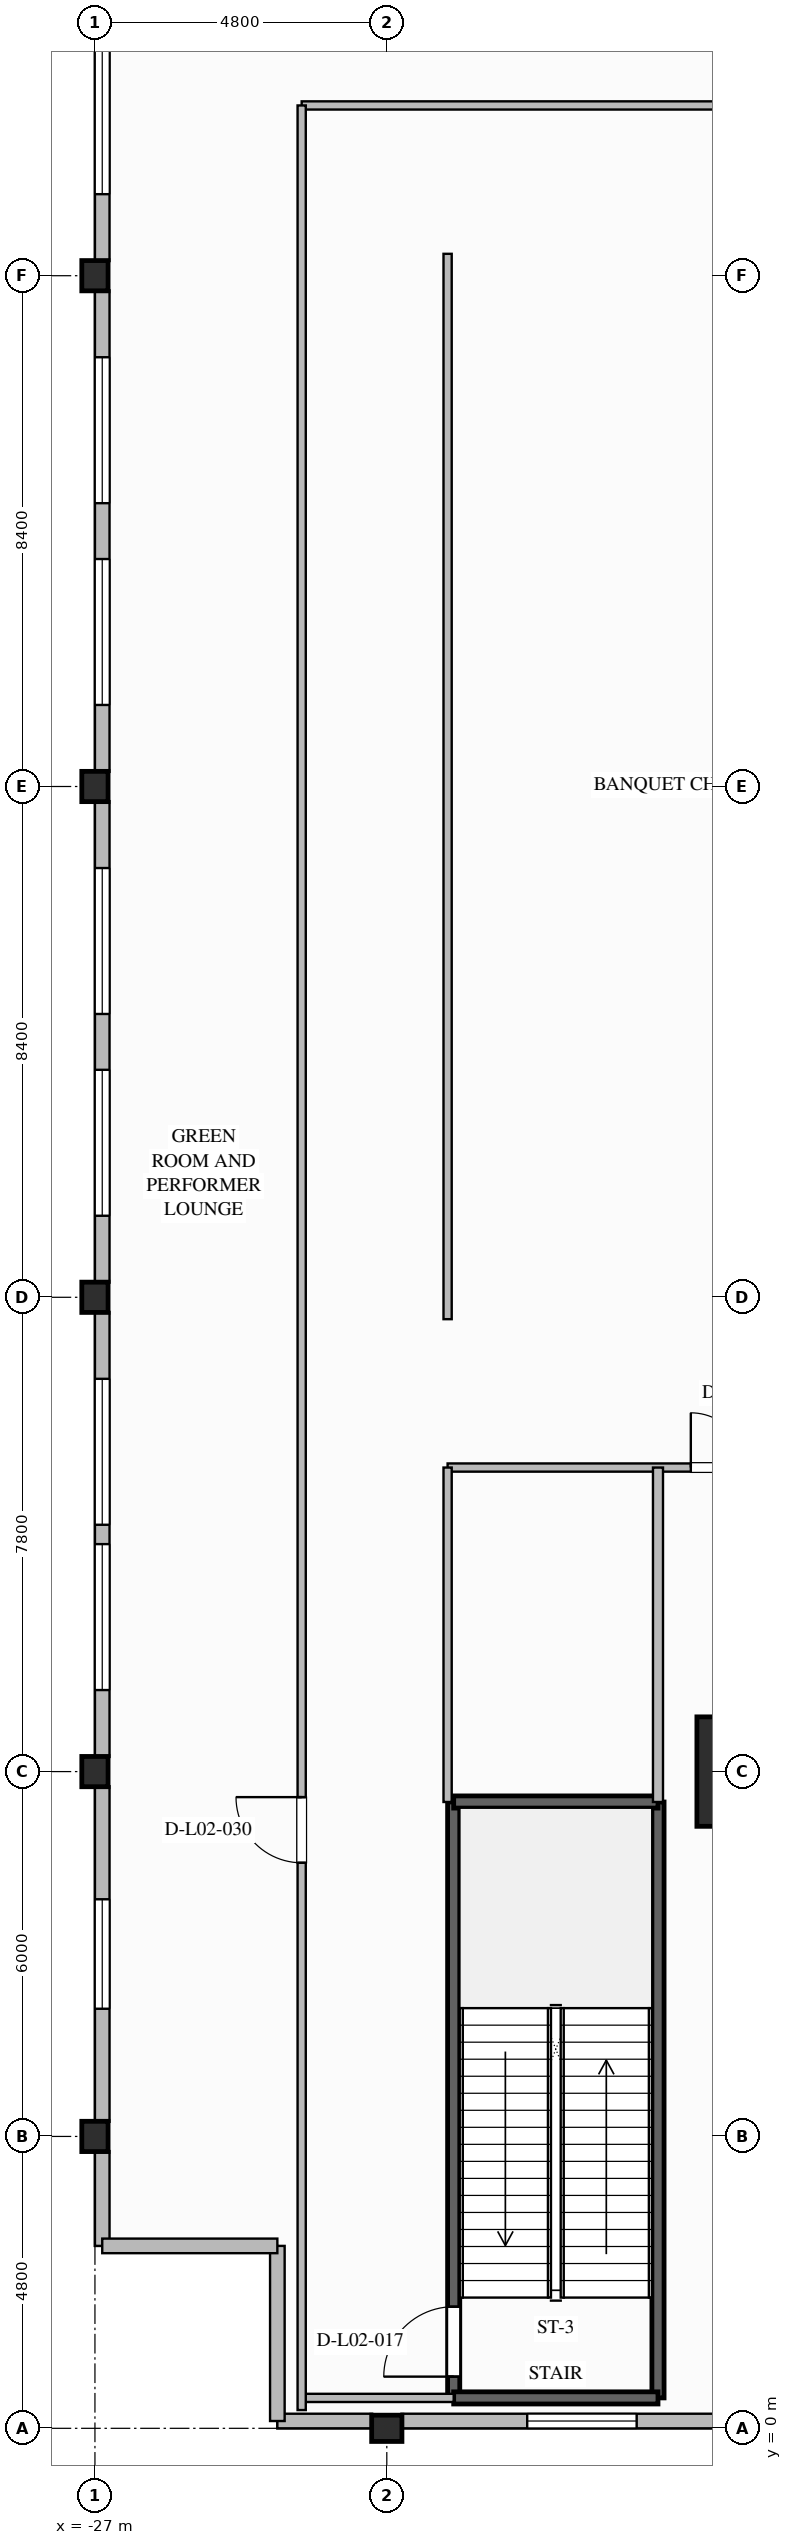
"""IFC4 building model, lengths in metres.
Left out: names, types, materials, properties, quantities, classifications, styles, units other than length and angle.
Written with IfcOpenShell. Run it as: python <this file> out.ifc"""

import sys

from ifc_helpers import new_model, si_unit, direction, frame, frame_2d, origin, origin_2d, place, context, subcontext, project, spatial, rectangle, i_section, extrude, element, fill, save


model = new_model("IFC4")
c1 = context("Model", 3, precision=1e-05, world=origin(), true_north=direction((0.0, 1.0)))
c2 = subcontext(c1, "Body", "Model", "MODEL_VIEW")
j1 = project(units=[si_unit("LENGTHUNIT", "METRE"), si_unit("PLANEANGLEUNIT", "RADIAN")], contexts=[c1])
p1 = place(None, origin())
s1 = spatial("IfcSite", under=j1, at=p1, CompositionType="ELEMENT")
p2 = place(p1, origin())
s2 = spatial("IfcBuilding", under=s1, at=p2, CompositionType="ELEMENT")
p3 = place(p2, frame((0.0, 0.0, 10.8)))
s3 = spatial("IfcBuildingStorey", under=s2, at=p3, CompositionType="ELEMENT", Elevation=10.8)
p4 = place(p3, frame((-16.2, 10.8, 0.0), z_axis=(0.0, 0.0, 1.0), x_axis=(1.0, 0.0, 0.0)))
e1 = element("IfcColumn", 1, at=p4, inside=s3, PredefinedType="COLUMN", context=c2, shape_type="SweptSolid", body=[
    extrude(rectangle(XDim=1.8, YDim=1.8, at=origin_2d()), origin(), (0.0, 0.0, 1.0), 6.4),
])
for number, where, z_axis, x_axis in (
    (2, (-27.0, 4.8, 0.0), (0.0, 0.0, 1.0), (1.0, 0.0, 0.0)),
    (3, (-27.0, 10.8, 0.0), (0.0, 0.0, 1.0), (1.0, 0.0, 0.0)),
    (4, (-27.0, 18.6, 0.0), (0.0, 0.0, 1.0), (1.0, 0.0, 0.0)),
    (5, (-27.0, 27.0, 0.0), (0.0, 0.0, 1.0), (1.0, 0.0, 0.0)),
    (6, (-27.0, 35.4, 0.0), (0.0, 0.0, 1.0), (1.0, 0.0, 0.0)),
    (7, (-22.2, 0.0, 0.0), (0.0, 0.0, 1.0), (0.0, 1.0, 0.0)),
):
    element("IfcColumn", number, at=place(p3, frame(where, z_axis=z_axis, x_axis=x_axis)), inside=s3, PredefinedType="COLUMN", context=c2, shape_type="SweptSolid", body=[
        extrude(i_section(OverallWidth=0.432, OverallDepth=0.498, WebThickness=0.056, FlangeThickness=0.089, FilletRadius=0.03, at=origin_2d()), origin(), (0.0, 0.0, 1.0), 6.4),
    ])
p5 = place(p3, frame((-26.88, 3.0, 0.0), z_axis=(0.0, 0.0, 1.0), x_axis=(0.0, 1.0, 0.0)))
e8 = element("IfcWall", 8, at=p5, inside=s3, PredefinedType="STANDARD", context=c2, shape_type="SweptSolid", body=[
    extrude(rectangle(XDim=1.559, YDim=0.24, at=frame_2d((0.78, 0.0))), origin(), (0.0, 0.0, 1.0), 6.1),
])
p6 = place(p3, frame((-26.88, 5.041, 0.0), z_axis=(0.0, 0.0, 1.0), x_axis=(0.0, 1.0, 0.0)))
e9 = element("IfcWall", 9, at=p6, inside=s3, PredefinedType="STANDARD", context=c2, shape_type="SweptSolid", body=[
    extrude(rectangle(XDim=5.518, YDim=0.24, at=frame_2d((2.759, 0.0))), origin(), (0.0, 0.0, 1.0), 5.404),
])
p7 = place(p6, frame((1.859, 0.0, 0.7)))
e10 = element("IfcOpeningElement", 10, at=p7, cuts=e9, PredefinedType="OPENING", context=c2, shape_type="SweptSolid", body=[
    extrude(rectangle(XDim=1.8, YDim=2.2, at=frame_2d((0.9, 1.1))), frame((0.0, 0.13, 0.0), z_axis=(0.0, -1.0, 0.0), x_axis=(1.0, 0.0, 0.0)), (0.0, 0.0, 1.0), 0.26),
])
p8 = place(p3, frame((-26.88, 11.041, 0.0), z_axis=(0.0, 0.0, 1.0), x_axis=(0.0, 1.0, 0.0)))
e11 = element("IfcWall", 11, at=p8, inside=s3, PredefinedType="STANDARD", context=c2, shape_type="SweptSolid", body=[
    extrude(rectangle(XDim=7.318, YDim=0.24, at=frame_2d((3.659, 0.0))), origin(), (0.0, 0.0, 1.0), 5.404),
])
p9 = place(p8, frame((1.1, 0.0, 0.7)))
e12 = element("IfcOpeningElement", 12, at=p9, cuts=e11, PredefinedType="OPENING", context=c2, shape_type="SweptSolid", body=[
    extrude(rectangle(XDim=2.4, YDim=2.4, at=frame_2d((1.2, 1.2))), frame((0.0, 0.13, 0.0), z_axis=(0.0, -1.0, 0.0), x_axis=(1.0, 0.0, 0.0)), (0.0, 0.0, 1.0), 0.26),
])
p10 = place(p8, frame((3.818, 0.0, 0.7)))
e13 = element("IfcOpeningElement", 13, at=p10, cuts=e11, PredefinedType="OPENING", context=c2, shape_type="SweptSolid", body=[
    extrude(rectangle(XDim=2.4, YDim=2.4, at=frame_2d((1.2, 1.2))), frame((0.0, 0.13, 0.0), z_axis=(0.0, -1.0, 0.0), x_axis=(1.0, 0.0, 0.0)), (0.0, 0.0, 1.0), 0.26),
])
p11 = place(p3, frame((-26.88, 18.841, 0.0), z_axis=(0.0, 0.0, 1.0), x_axis=(0.0, 1.0, 0.0)))
e14 = element("IfcWall", 14, at=p11, inside=s3, PredefinedType="STANDARD", context=c2, shape_type="SweptSolid", body=[
    extrude(rectangle(XDim=7.918, YDim=0.24, at=frame_2d((3.959, 0.0))), origin(), (0.0, 0.0, 1.0), 5.404),
])
p12 = place(p11, frame((1.1, 0.0, 0.7)))
e15 = element("IfcOpeningElement", 15, at=p12, cuts=e14, PredefinedType="OPENING", context=c2, shape_type="SweptSolid", body=[
    extrude(rectangle(XDim=2.4, YDim=2.4, at=frame_2d((1.2, 1.2))), frame((0.0, 0.13, 0.0), z_axis=(0.0, -1.0, 0.0), x_axis=(1.0, 0.0, 0.0)), (0.0, 0.0, 1.0), 0.26),
])
p13 = place(p11, frame((4.418, 0.0, 0.7)))
e16 = element("IfcOpeningElement", 16, at=p13, cuts=e14, PredefinedType="OPENING", context=c2, shape_type="SweptSolid", body=[
    extrude(rectangle(XDim=2.4, YDim=2.4, at=frame_2d((1.2, 1.2))), frame((0.0, 0.13, 0.0), z_axis=(0.0, -1.0, 0.0), x_axis=(1.0, 0.0, 0.0)), (0.0, 0.0, 1.0), 0.26),
])
p14 = place(p3, frame((-26.88, 27.241, 0.0), z_axis=(0.0, 0.0, 1.0), x_axis=(0.0, 1.0, 0.0)))
e17 = element("IfcWall", 17, at=p14, inside=s3, PredefinedType="STANDARD", context=c2, shape_type="SweptSolid", body=[
    extrude(rectangle(XDim=7.918, YDim=0.24, at=frame_2d((3.959, 0.0))), origin(), (0.0, 0.0, 1.0), 5.404),
])
p15 = place(p14, frame((1.1, 0.0, 0.7)))
e18 = element("IfcOpeningElement", 18, at=p15, cuts=e17, PredefinedType="OPENING", context=c2, shape_type="SweptSolid", body=[
    extrude(rectangle(XDim=2.4, YDim=2.4, at=frame_2d((1.2, 1.2))), frame((0.0, 0.13, 0.0), z_axis=(0.0, -1.0, 0.0), x_axis=(1.0, 0.0, 0.0)), (0.0, 0.0, 1.0), 0.26),
])
p16 = place(p14, frame((4.418, 0.0, 0.7)))
e19 = element("IfcOpeningElement", 19, at=p16, cuts=e17, PredefinedType="OPENING", context=c2, shape_type="SweptSolid", body=[
    extrude(rectangle(XDim=2.4, YDim=2.4, at=frame_2d((1.2, 1.2))), frame((0.0, 0.13, 0.0), z_axis=(0.0, -1.0, 0.0), x_axis=(1.0, 0.0, 0.0)), (0.0, 0.0, 1.0), 0.26),
])
p17 = place(p3, frame((-26.88, 35.641, 0.0), z_axis=(0.0, 0.0, 1.0), x_axis=(0.0, 1.0, 0.0)))
e20 = element("IfcWall", 20, at=p17, inside=s3, PredefinedType="STANDARD", context=c2, shape_type="SweptSolid", body=[
    extrude(rectangle(XDim=7.318, YDim=0.24, at=frame_2d((3.659, 0.0))), origin(), (0.0, 0.0, 1.0), 5.404),
])
p18 = place(p17, frame((1.1, 0.0, 0.7)))
e21 = element("IfcOpeningElement", 21, at=p18, cuts=e20, PredefinedType="OPENING", context=c2, shape_type="SweptSolid", body=[
    extrude(rectangle(XDim=2.4, YDim=2.4, at=frame_2d((1.2, 1.2))), frame((0.0, 0.13, 0.0), z_axis=(0.0, -1.0, 0.0), x_axis=(1.0, 0.0, 0.0)), (0.0, 0.0, 1.0), 0.26),
])
p19 = place(p17, frame((3.818, 0.0, 0.7)))
e22 = element("IfcOpeningElement", 22, at=p19, cuts=e20, PredefinedType="OPENING", context=c2, shape_type="SweptSolid", body=[
    extrude(rectangle(XDim=2.4, YDim=2.4, at=frame_2d((1.2, 1.2))), frame((0.0, 0.13, 0.0), z_axis=(0.0, -1.0, 0.0), x_axis=(1.0, 0.0, 0.0)), (0.0, 0.0, 1.0), 0.26),
])
p20 = place(p3, frame((-22.441, 0.12, 0.0), z_axis=(0.0, 0.0, 1.0), x_axis=(-1.0, 0.0, 0.0)))
e23 = element("IfcWall", 23, at=p20, inside=s3, PredefinedType="STANDARD", context=c2, shape_type="SweptSolid", body=[
    extrude(rectangle(XDim=1.559, YDim=0.24, at=frame_2d((0.78, 0.0))), origin(), (0.0, 0.0, 1.0), 6.1),
])
p21 = place(p3, frame((-16.441, 0.12, 0.0), z_axis=(0.0, 0.0, 1.0), x_axis=(-1.0, 0.0, 0.0)))
e24 = element("IfcWall", 24, at=p21, inside=s3, PredefinedType="STANDARD", context=c2, shape_type="SweptSolid", body=[
    extrude(rectangle(XDim=5.518, YDim=0.24, at=frame_2d((2.759, 0.0))), origin(), (0.0, 0.0, 1.0), 5.404),
])
p22 = place(p21, frame((1.65, 0.0, 0.65)))
e25 = element("IfcOpeningElement", 25, at=p22, cuts=e24, PredefinedType="OPENING", context=c2, shape_type="SweptSolid", body=[
    extrude(rectangle(XDim=1.8, YDim=2.2, at=frame_2d((0.9, 1.1))), frame((0.0, 0.13, 0.0), z_axis=(0.0, -1.0, 0.0), x_axis=(1.0, 0.0, 0.0)), (0.0, 0.0, 1.0), 0.26),
])
for number, where, z_axis, x_axis in (
    (26, (-24.0, 0.12, 0.0), (0.0, 0.0, 1.0), (0.0, 1.0, 0.0)),
    (27, (-24.0, 3.0, 0.0), (0.0, 0.0, 1.0), (-1.0, 0.0, 0.0)),
):
    element("IfcWall", number, at=place(p3, frame(where, z_axis=z_axis, x_axis=x_axis)), inside=s3, PredefinedType="STANDARD", context=c2, shape_type="SweptSolid", body=[
        extrude(rectangle(XDim=2.88, YDim=0.24, at=frame_2d((1.44, 0.0))), origin(), (0.0, 0.0, 1.0), 6.1),
    ])
p23 = place(p3, frame((-21.1, 0.5, 0.0), z_axis=(0.0, 0.0, 1.0), x_axis=(0.0, 1.0, 0.0)))
e28 = element("IfcWall", 28, at=p23, inside=s3, PredefinedType="SOLIDWALL", context=c2, shape_type="SweptSolid", body=[
    extrude(rectangle(XDim=9.8, YDim=0.2, at=frame_2d((4.9, 0.0))), origin(), (0.0, 0.0, 1.0), 6.1),
])
p24 = place(p23, frame((0.35, 0.0, 0.0)))
e29 = element("IfcOpeningElement", 29, at=p24, cuts=e28, PredefinedType="OPENING", context=c2, shape_type="SweptSolid", body=[
    extrude(rectangle(XDim=1.15, YDim=2.15, at=frame_2d((0.575, 1.075))), frame((0.0, 0.11, 0.0), z_axis=(0.0, -1.0, 0.0), x_axis=(1.0, 0.0, 0.0)), (0.0, 0.0, 1.0), 0.22),
])
p25 = place(p3, frame((-17.74, 10.3, 0.0), z_axis=(0.0, 0.0, 1.0), x_axis=(0.0, -1.0, 0.0)))
e30 = element("IfcWall", 30, at=p25, inside=s3, PredefinedType="SOLIDWALL", context=c2, shape_type="SweptSolid", body=[
    extrude(rectangle(XDim=9.8, YDim=0.2, at=frame_2d((4.9, 0.0))), origin(), (0.0, 0.0, 1.0), 6.1),
])
for number, where, z_axis, x_axis in (
    (31, (-21.1, 0.5, 0.0), (0.0, 0.0, 1.0), (1.0, 0.0, 0.0)),
    (32, (-17.74, 10.3, 0.0), (0.0, 0.0, 1.0), (-1.0, 0.0, 0.0)),
):
    element("IfcWall", number, at=place(p3, frame(where, z_axis=z_axis, x_axis=x_axis)), inside=s3, PredefinedType="SOLIDWALL", context=c2, shape_type="SweptSolid", body=[
        extrude(rectangle(XDim=3.36, YDim=0.2, at=frame_2d((1.68, 0.0))), origin(), (0.0, 0.0, 1.0), 6.1),
    ])
p26 = place(p3, frame((-21.2, 15.8, 0.0), z_axis=(0.0, 0.0, 1.0), x_axis=(1.0, 0.0, 0.0)))
e33 = element("IfcWall", 33, at=p26, inside=s3, PredefinedType="PARTITIONING", context=c2, shape_type="SweptSolid", body=[
    extrude(rectangle(XDim=46.3, YDim=0.135, at=frame_2d((23.15, 0.0))), origin(), (0.0, 0.0, 1.0), 6.1),
])
p27 = place(p26, frame((4.0, 0.0, 0.0)))
e34 = element("IfcOpeningElement", 34, at=p27, cuts=e33, PredefinedType="OPENING", context=c2, shape_type="SweptSolid", body=[
    extrude(rectangle(XDim=1.8, YDim=2.35, at=frame_2d((0.9, 1.175))), frame((0.0, 0.077, 0.0), z_axis=(0.0, -1.0, 0.0), x_axis=(1.0, 0.0, 0.0)), (0.0, 0.0, 1.0), 0.155),
])
p28 = place(p26, frame((14.0, 0.0, 0.0)))
e35 = element("IfcOpeningElement", 35, at=p28, cuts=e33, PredefinedType="OPENING", context=c2, shape_type="SweptSolid", body=[
    extrude(rectangle(XDim=1.8, YDim=2.35, at=frame_2d((0.9, 1.175))), frame((0.0, 0.077, 0.0), z_axis=(0.0, -1.0, 0.0), x_axis=(1.0, 0.0, 0.0)), (0.0, 0.0, 1.0), 0.155),
])
p29 = place(p26, frame((23.0, 0.0, 0.0)))
e36 = element("IfcOpeningElement", 36, at=p29, cuts=e33, PredefinedType="OPENING", context=c2, shape_type="SweptSolid", body=[
    extrude(rectangle(XDim=1.8, YDim=2.35, at=frame_2d((0.9, 1.175))), frame((0.0, 0.077, 0.0), z_axis=(0.0, -1.0, 0.0), x_axis=(1.0, 0.0, 0.0)), (0.0, 0.0, 1.0), 0.155),
])
p30 = place(p26, frame((41.2, 0.0, 0.0)))
e37 = element("IfcOpeningElement", 37, at=p30, cuts=e33, PredefinedType="OPENING", context=c2, shape_type="SweptSolid", body=[
    extrude(rectangle(XDim=1.26, YDim=2.2, at=frame_2d((0.63, 1.1))), frame((0.0, 0.077, 0.0), z_axis=(0.0, -1.0, 0.0), x_axis=(1.0, 0.0, 0.0)), (0.0, 0.0, 1.0), 0.155),
])
p31 = place(p3, frame((-23.6, 38.2, 0.0), z_axis=(0.0, 0.0, 1.0), x_axis=(1.0, 0.0, 0.0)))
e38 = element("IfcWall", 38, at=p31, inside=s3, PredefinedType="PARTITIONING", context=c2, shape_type="SweptSolid", body=[
    extrude(rectangle(XDim=47.3, YDim=0.135, at=frame_2d((23.65, 0.0))), origin(), (0.0, 0.0, 1.0), 6.1),
])
p32 = place(p31, frame((39.2, 0.0, 0.0)))
e39 = element("IfcOpeningElement", 39, at=p32, cuts=e38, PredefinedType="OPENING", context=c2, shape_type="SweptSolid", body=[
    extrude(rectangle(XDim=0.98, YDim=2.1, at=frame_2d((0.49, 1.05))), frame((0.0, 0.077, 0.0), z_axis=(0.0, -1.0, 0.0), x_axis=(1.0, 0.0, 0.0)), (0.0, 0.0, 1.0), 0.155),
])
p33 = place(p31, frame((44.0, 0.0, 0.0)))
e40 = element("IfcOpeningElement", 40, at=p33, cuts=e38, PredefinedType="OPENING", context=c2, shape_type="SweptSolid", body=[
    extrude(rectangle(XDim=0.92, YDim=2.1, at=frame_2d((0.46, 1.05))), frame((0.0, 0.077, 0.0), z_axis=(0.0, -1.0, 0.0), x_axis=(1.0, 0.0, 0.0)), (0.0, 0.0, 1.0), 0.155),
])
p34 = place(p31, frame((12.0, 0.0, 0.0)))
e41 = element("IfcOpeningElement", 41, at=p34, cuts=e38, PredefinedType="OPENING", context=c2, shape_type="SweptSolid", body=[
    extrude(rectangle(XDim=1.36, YDim=2.2, at=frame_2d((0.68, 1.1))), frame((0.0, 0.077, 0.0), z_axis=(0.0, -1.0, 0.0), x_axis=(1.0, 0.0, 0.0)), (0.0, 0.0, 1.0), 0.155),
])
p35 = place(p31, frame((30.0, 0.0, 0.0)))
e42 = element("IfcOpeningElement", 42, at=p35, cuts=e38, PredefinedType="OPENING", context=c2, shape_type="SweptSolid", body=[
    extrude(rectangle(XDim=1.02, YDim=2.15, at=frame_2d((0.51, 1.075))), frame((0.0, 0.077, 0.0), z_axis=(0.0, -1.0, 0.0), x_axis=(1.0, 0.0, 0.0)), (0.0, 0.0, 1.0), 0.155),
])
p36 = place(p3, frame((-17.74, 10.3, 0.0), z_axis=(0.0, 0.0, 1.0), x_axis=(0.0, 1.0, 0.0)))
e43 = element("IfcWall", 43, at=p36, inside=s3, PredefinedType="PARTITIONING", context=c2, shape_type="SweptSolid", body=[
    extrude(rectangle(XDim=5.5, YDim=0.165, at=frame_2d((2.75, 0.0))), origin(), (0.0, 0.0, 1.0), 6.1),
])
p37 = place(p3, frame((-21.2, 10.3, 0.0), z_axis=(0.0, 0.0, 1.0), x_axis=(0.0, 1.0, 0.0)))
e44 = element("IfcWall", 44, at=p37, inside=s3, PredefinedType="PARTITIONING", context=c2, shape_type="SweptSolid", body=[
    extrude(rectangle(XDim=5.5, YDim=0.135, at=frame_2d((2.75, 0.0))), origin(), (0.0, 0.0, 1.0), 6.1),
])
p38 = place(p3, frame((-21.2, 18.24, 0.0), z_axis=(0.0, 0.0, 1.0), x_axis=(0.0, 1.0, 0.0)))
e45 = element("IfcWall", 45, at=p38, inside=s3, PredefinedType="PARTITIONING", context=c2, shape_type="SweptSolid", body=[
    extrude(rectangle(XDim=17.52, YDim=0.135, at=frame_2d((8.76, 0.0))), origin(), (0.0, 0.0, 1.0), 6.1),
])
p39 = place(p3, frame((-23.6, 0.5, 0.0), z_axis=(0.0, 0.0, 1.0), x_axis=(1.0, 0.0, 0.0)))
e46 = element("IfcWall", 46, at=p39, inside=s3, PredefinedType="PARTITIONING", context=c2, shape_type="SweptSolid", body=[
    extrude(rectangle(XDim=2.5, YDim=0.135, at=frame_2d((1.25, 0.0))), origin(), (0.0, 0.0, 1.0), 6.1),
])
p40 = place(p3, frame((-23.6, 0.3, 0.0), z_axis=(0.0, 0.0, 1.0), x_axis=(0.0, 1.0, 0.0)))
e47 = element("IfcWall", 47, at=p40, inside=s3, PredefinedType="PARTITIONING", context=c2, shape_type="SweptSolid", body=[
    extrude(rectangle(XDim=37.9, YDim=0.135, at=frame_2d((18.95, 0.0))), origin(), (0.0, 0.0, 1.0), 6.1),
])
p41 = place(p40, frame((9.0, 0.0, 0.0)))
e48 = element("IfcOpeningElement", 48, at=p41, cuts=e47, PredefinedType="OPENING", context=c2, shape_type="SweptSolid", body=[
    extrude(rectangle(XDim=1.08, YDim=2.04, at=frame_2d((0.54, 1.02))), frame((0.0, 0.077, 0.0), z_axis=(0.0, -1.0, 0.0), x_axis=(1.0, 0.0, 0.0)), (0.0, 0.0, 1.0), 0.155),
])
p42 = place(p7, origin())
e49 = element("IfcWindow", 49, at=p42, inside=s3, PartitioningType="SINGLE_PANEL", PredefinedType="WINDOW", context=c2, shape_type="SweptSolid", body=[
    extrude(rectangle(XDim=1.8, YDim=2.2, at=frame_2d((0.9, 1.1))), frame((0.0, 0.03, 0.0), z_axis=(0.0, -1.0, 0.0), x_axis=(1.0, 0.0, 0.0)), (0.0, 0.0, 1.0), 0.06),
])
fill(e10, e49)
p43 = place(p9, origin())
e50 = element("IfcWindow", 50, at=p43, inside=s3, PartitioningType="SINGLE_PANEL", PredefinedType="WINDOW", context=c2, shape_type="SweptSolid", body=[
    extrude(rectangle(XDim=2.4, YDim=2.4, at=frame_2d((1.2, 1.2))), frame((0.0, 0.03, 0.0), z_axis=(0.0, -1.0, 0.0), x_axis=(1.0, 0.0, 0.0)), (0.0, 0.0, 1.0), 0.06),
])
fill(e12, e50)
p44 = place(p10, origin())
e51 = element("IfcWindow", 51, at=p44, inside=s3, PartitioningType="SINGLE_PANEL", PredefinedType="WINDOW", context=c2, shape_type="SweptSolid", body=[
    extrude(rectangle(XDim=2.4, YDim=2.4, at=frame_2d((1.2, 1.2))), frame((0.0, 0.03, 0.0), z_axis=(0.0, -1.0, 0.0), x_axis=(1.0, 0.0, 0.0)), (0.0, 0.0, 1.0), 0.06),
])
fill(e13, e51)
p45 = place(p12, origin())
e52 = element("IfcWindow", 52, at=p45, inside=s3, PartitioningType="SINGLE_PANEL", PredefinedType="WINDOW", context=c2, shape_type="SweptSolid", body=[
    extrude(rectangle(XDim=2.4, YDim=2.4, at=frame_2d((1.2, 1.2))), frame((0.0, 0.03, 0.0), z_axis=(0.0, -1.0, 0.0), x_axis=(1.0, 0.0, 0.0)), (0.0, 0.0, 1.0), 0.06),
])
fill(e15, e52)
p46 = place(p13, origin())
e53 = element("IfcWindow", 53, at=p46, inside=s3, PartitioningType="SINGLE_PANEL", PredefinedType="WINDOW", context=c2, shape_type="SweptSolid", body=[
    extrude(rectangle(XDim=2.4, YDim=2.4, at=frame_2d((1.2, 1.2))), frame((0.0, 0.03, 0.0), z_axis=(0.0, -1.0, 0.0), x_axis=(1.0, 0.0, 0.0)), (0.0, 0.0, 1.0), 0.06),
])
fill(e16, e53)
p47 = place(p15, origin())
e54 = element("IfcWindow", 54, at=p47, inside=s3, PartitioningType="SINGLE_PANEL", PredefinedType="WINDOW", context=c2, shape_type="SweptSolid", body=[
    extrude(rectangle(XDim=2.4, YDim=2.4, at=frame_2d((1.2, 1.2))), frame((0.0, 0.03, 0.0), z_axis=(0.0, -1.0, 0.0), x_axis=(1.0, 0.0, 0.0)), (0.0, 0.0, 1.0), 0.06),
])
fill(e18, e54)
p48 = place(p16, origin())
e55 = element("IfcWindow", 55, at=p48, inside=s3, PartitioningType="SINGLE_PANEL", PredefinedType="WINDOW", context=c2, shape_type="SweptSolid", body=[
    extrude(rectangle(XDim=2.4, YDim=2.4, at=frame_2d((1.2, 1.2))), frame((0.0, 0.03, 0.0), z_axis=(0.0, -1.0, 0.0), x_axis=(1.0, 0.0, 0.0)), (0.0, 0.0, 1.0), 0.06),
])
fill(e19, e55)
p49 = place(p18, origin())
e56 = element("IfcWindow", 56, at=p49, inside=s3, PartitioningType="SINGLE_PANEL", PredefinedType="WINDOW", context=c2, shape_type="SweptSolid", body=[
    extrude(rectangle(XDim=2.4, YDim=2.4, at=frame_2d((1.2, 1.2))), frame((0.0, 0.03, 0.0), z_axis=(0.0, -1.0, 0.0), x_axis=(1.0, 0.0, 0.0)), (0.0, 0.0, 1.0), 0.06),
])
fill(e21, e56)
p50 = place(p22, origin())
e57 = element("IfcWindow", 57, at=p50, inside=s3, PartitioningType="SINGLE_PANEL", PredefinedType="WINDOW", context=c2, shape_type="SweptSolid", body=[
    extrude(rectangle(XDim=1.8, YDim=2.2, at=frame_2d((0.9, 1.1))), frame((0.0, 0.03, 0.0), z_axis=(0.0, -1.0, 0.0), x_axis=(1.0, 0.0, 0.0)), (0.0, 0.0, 1.0), 0.06),
])
fill(e25, e57)
p51 = place(p24, origin())
e58 = element("IfcDoor", 58, at=p51, inside=s3, OperationType="SINGLE_SWING_LEFT", PredefinedType="DOOR", context=c2, shape_type="SweptSolid", body=[
    extrude(rectangle(XDim=1.15, YDim=2.15, at=frame_2d((0.575, 1.075))), frame((0.0, 0.025, 0.0), z_axis=(0.0, -1.0, 0.0), x_axis=(1.0, 0.0, 0.0)), (0.0, 0.0, 1.0), 0.05),
])
fill(e29, e58)
p52 = place(p27, origin())
e59 = element("IfcDoor", 59, at=p52, inside=s3, OperationType="DOUBLE_DOOR_SINGLE_SWING", PredefinedType="DOOR", context=c2, shape_type="SweptSolid", body=[
    extrude(rectangle(XDim=1.8, YDim=2.35, at=frame_2d((0.9, 1.175))), frame((0.0, 0.025, 0.0), z_axis=(0.0, -1.0, 0.0), x_axis=(1.0, 0.0, 0.0)), (0.0, 0.0, 1.0), 0.05),
])
fill(e34, e59)
p53 = place(p41, origin())
e60 = element("IfcDoor", 60, at=p53, inside=s3, OperationType="SINGLE_SWING_RIGHT", PredefinedType="DOOR", context=c2, shape_type="SweptSolid", body=[
    extrude(rectangle(XDim=1.08, YDim=2.04, at=frame_2d((0.54, 1.02))), frame((0.0, 0.025, 0.0), z_axis=(0.0, -1.0, 0.0), x_axis=(1.0, 0.0, 0.0)), (0.0, 0.0, 1.0), 0.05),
])
fill(e48, e60)
save(model, sys.argv[1])
